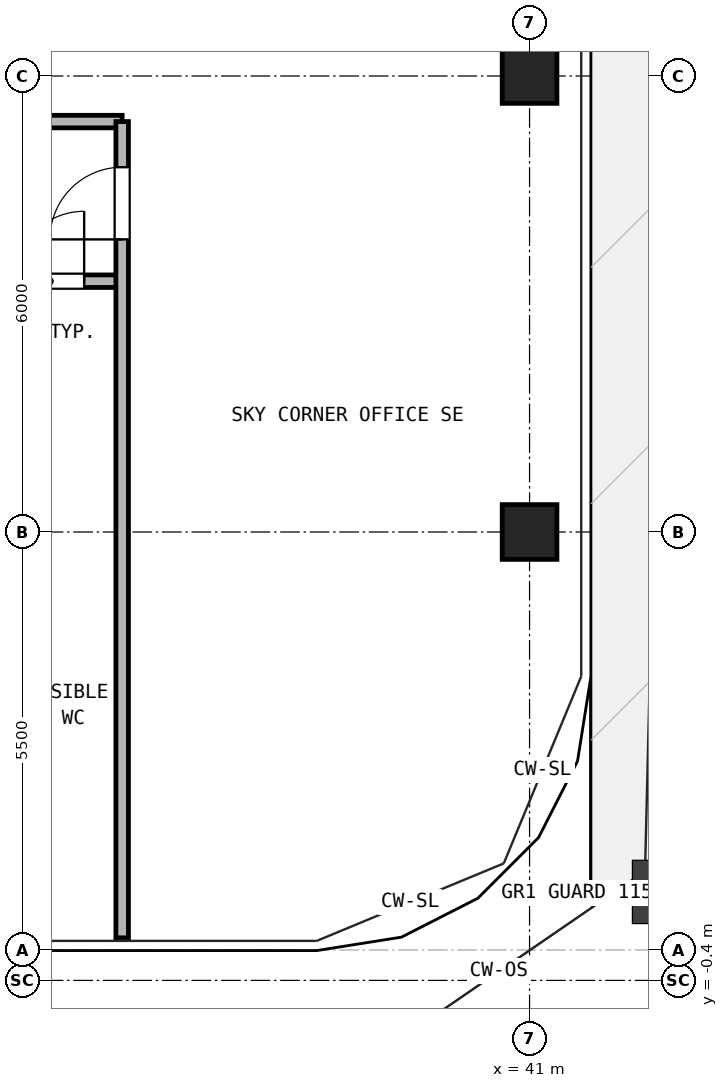
"""IFC4 building model, lengths in metres.
Left out: names, types, materials, properties, quantities, classifications, styles, units other than length and angle.
Written with IfcOpenShell. Run it as: python <this file> out.ifc"""

import sys

from ifc_helpers import new_model, si_unit, direction, frame, frame_2d, origin, origin_2d, place, context, subcontext, project, spatial, rectangle, hollow_rectangle, extrude, source, transform, mapped, element, fill, save


model = new_model("IFC4")
c1 = context("Model", 3, precision=1e-05, world=origin(), true_north=direction((0.0, 1.0)))
c2 = subcontext(c1, "Body", "Model", "MODEL_VIEW")
j1 = project(units=[si_unit("LENGTHUNIT", "METRE"), si_unit("PLANEANGLEUNIT", "RADIAN")], contexts=[c1])
p1 = place(None, origin())
s1 = spatial("IfcSite", under=j1, at=p1, CompositionType="ELEMENT")
p2 = place(p1, origin())
s2 = spatial("IfcBuilding", under=s1, at=p2, CompositionType="ELEMENT")
p3 = place(p2, frame((0.0, 0.0, 151.6)))
s3 = spatial("IfcBuildingStorey", under=s2, at=p3, CompositionType="ELEMENT", Elevation=151.6)
m1 = source(origin(), c2, "Body", "SweptSolid", [
    extrude(hollow_rectangle(XDim=0.72, YDim=0.72, WallThickness=0.04, at=origin_2d()), origin(), (0.0, 0.0, 1.0), 4.25),
])
for number, where, z_axis, x_axis in (
    (1, (41.0, 5.5, 0.0), (0.0, 0.0, 1.0), (1.0, 0.0, 0.0)),
    (2, (41.0, 11.5, 0.0), (0.0, 0.0, 1.0), (1.0, 0.0, 0.0)),
):
    element("IfcColumn", number, at=place(p3, frame(where, z_axis=z_axis, x_axis=x_axis)), inside=s3, PredefinedType="COLUMN", context=c2, shape_type="MappedRepresentation", body=[
        mapped(m1, transform((0.0, 0.0, 0.0), x_axis=(1.0, 0.0, 0.0), y_axis=(0.0, 1.0, 0.0), z_axis=(0.0, 0.0, 1.0), scale=1.0)),
    ])
p4 = place(p3, frame((8.0, 8.8, 0.0), z_axis=(0.0, 0.0, 1.0), x_axis=(1.0, 0.0, 0.0)))
e3 = element("IfcWall", 3, at=p4, inside=s3, PredefinedType="PARTITIONING", context=c2, shape_type="SweptSolid", body=[
    extrude(rectangle(XDim=27.64, YDim=0.165, at=frame_2d((13.82, 0.0))), origin(), (0.0, 0.0, 1.0), 4.25),
])
p5 = place(p4, frame((4.75, 0.0, 0.0)))
e4 = element("IfcOpeningElement", 4, at=p5, cuts=e3, PredefinedType="OPENING", context=c2, shape_type="SweptSolid", body=[
    extrude(rectangle(XDim=0.95, YDim=2.15, at=frame_2d((0.475, 1.075))), frame((0.0, 0.093, 0.0), z_axis=(0.0, -1.0, 0.0), x_axis=(1.0, 0.0, 0.0)), (0.0, 0.0, 1.0), 0.185),
])
p6 = place(p4, frame((14.5, 0.0, 0.0)))
e5 = element("IfcOpeningElement", 5, at=p6, cuts=e3, PredefinedType="OPENING", context=c2, shape_type="SweptSolid", body=[
    extrude(rectangle(XDim=0.95, YDim=2.15, at=frame_2d((0.475, 1.075))), frame((0.0, 0.093, 0.0), z_axis=(0.0, -1.0, 0.0), x_axis=(1.0, 0.0, 0.0)), (0.0, 0.0, 1.0), 0.185),
])
p7 = place(p4, frame((21.0, 0.0, 0.0)))
e6 = element("IfcOpeningElement", 6, at=p7, cuts=e3, PredefinedType="OPENING", context=c2, shape_type="SweptSolid", body=[
    extrude(rectangle(XDim=0.95, YDim=2.15, at=frame_2d((0.475, 1.075))), frame((0.0, 0.093, 0.0), z_axis=(0.0, -1.0, 0.0), x_axis=(1.0, 0.0, 0.0)), (0.0, 0.0, 1.0), 0.185),
])
p8 = place(p4, frame((24.15, 0.0, 0.0)))
e7 = element("IfcOpeningElement", 7, at=p8, cuts=e3, PredefinedType="OPENING", context=c2, shape_type="SweptSolid", body=[
    extrude(rectangle(XDim=1.0, YDim=2.15, at=frame_2d((0.5, 1.075))), frame((0.0, 0.093, 0.0), z_axis=(0.0, -1.0, 0.0), x_axis=(1.0, 0.0, 0.0)), (0.0, 0.0, 1.0), 0.185),
])
p9 = place(p4, frame((26.22, 0.0, 0.0)))
e8 = element("IfcOpeningElement", 8, at=p9, cuts=e3, PredefinedType="OPENING", context=c2, shape_type="SweptSolid", body=[
    extrude(rectangle(XDim=0.92, YDim=2.1, at=frame_2d((0.46, 1.05))), frame((0.0, 0.093, 0.0), z_axis=(0.0, -1.0, 0.0), x_axis=(1.0, 0.0, 0.0)), (0.0, 0.0, 1.0), 0.185),
])
p10 = place(p3, frame((30.7, 10.9, 0.0), z_axis=(0.0, 0.0, 1.0), x_axis=(1.0, 0.0, 0.0)))
e9 = element("IfcWall", 9, at=p10, inside=s3, PredefinedType="PARTITIONING", context=c2, shape_type="SweptSolid", body=[
    extrude(rectangle(XDim=4.94, YDim=0.165, at=frame_2d((2.47, 0.0))), origin(), (0.0, 0.0, 1.0), 4.25),
])
p11 = place(p3, frame((35.64, 0.16, 0.0), z_axis=(0.0, 0.0, 1.0), x_axis=(0.0, 1.0, 0.0)))
e10 = element("IfcWall", 10, at=p11, inside=s3, PredefinedType="PARTITIONING", context=c2, shape_type="SweptSolid", body=[
    extrude(rectangle(XDim=10.74, YDim=0.165, at=frame_2d((5.37, 0.0))), origin(), (0.0, 0.0, 1.0), 4.25),
])
p12 = place(p11, frame((9.19, 0.0, 0.0)))
e11 = element("IfcOpeningElement", 11, at=p12, cuts=e10, PredefinedType="OPENING", context=c2, shape_type="SweptSolid", body=[
    extrude(rectangle(XDim=0.95, YDim=2.15, at=frame_2d((0.475, 1.075))), frame((0.0, 0.093, 0.0), z_axis=(0.0, -1.0, 0.0), x_axis=(1.0, 0.0, 0.0)), (0.0, 0.0, 1.0), 0.185),
])
p13 = place(p9, frame((0.92, 0.0, 0.0), z_axis=(0.0, 0.0, 1.0), x_axis=(-1.0, 0.0, 0.0)))
e12 = element("IfcDoor", 12, at=p13, inside=s3, OperationType="SINGLE_SWING_RIGHT", PredefinedType="DOOR", context=c2, shape_type="SweptSolid", body=[
    extrude(rectangle(XDim=0.92, YDim=2.1, at=frame_2d((0.46, 1.05))), frame((0.0, 0.025, 0.0), z_axis=(0.0, -1.0, 0.0), x_axis=(1.0, 0.0, 0.0)), (0.0, 0.0, 1.0), 0.05),
])
fill(e8, e12)
p14 = place(p12, origin())
e13 = element("IfcDoor", 13, at=p14, inside=s3, OperationType="SINGLE_SWING_LEFT", PredefinedType="DOOR", context=c2, shape_type="SweptSolid", body=[
    extrude(rectangle(XDim=0.95, YDim=2.15, at=frame_2d((0.475, 1.075))), frame((0.0, 0.025, 0.0), z_axis=(0.0, -1.0, 0.0), x_axis=(1.0, 0.0, 0.0)), (0.0, 0.0, 1.0), 0.05),
])
fill(e11, e13)
save(model, sys.argv[1])
